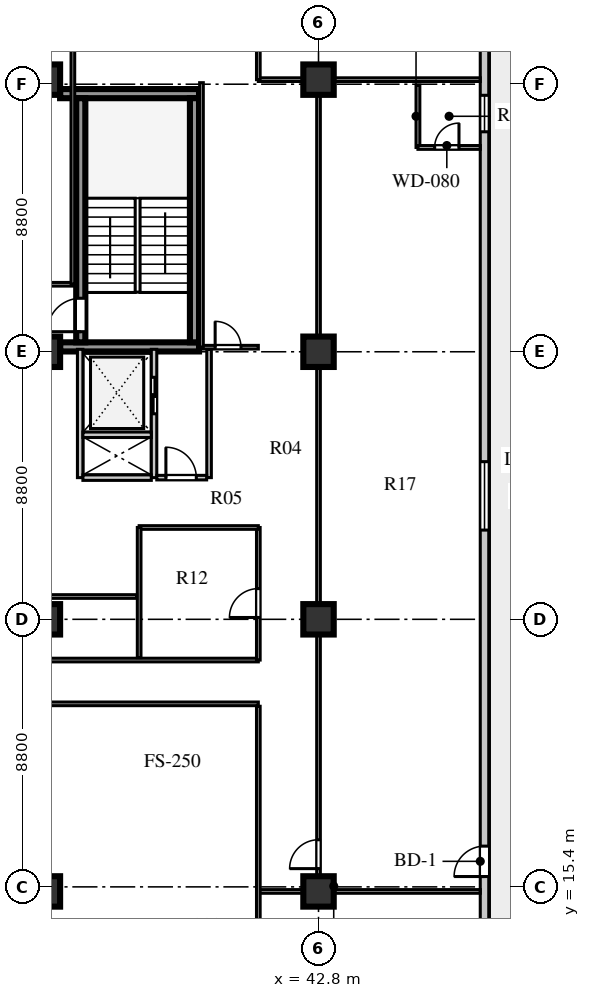
"""IFC4 building model, lengths in metres.
Left out: names, types, materials, properties, quantities, classifications, styles, units other than length and angle.
Written with IfcOpenShell. Run it as: python <this file> out.ifc"""

import sys

from ifc_helpers import new_model, si_unit, direction, frame, frame_2d, origin, origin_2d, place, context, subcontext, project, spatial, rectangle, extrude, element, fill, save


model = new_model("IFC4")
c1 = context("Model", 3, precision=1e-05, world=origin(), true_north=direction((0.0, 1.0)))
c2 = subcontext(c1, "Body", "Model", "MODEL_VIEW")
j1 = project(units=[si_unit("LENGTHUNIT", "METRE"), si_unit("PLANEANGLEUNIT", "RADIAN")], contexts=[c1])
p1 = place(None, origin())
s1 = spatial("IfcSite", under=j1, at=p1, CompositionType="ELEMENT")
p2 = place(p1, origin())
s2 = spatial("IfcBuilding", under=s1, at=p2, CompositionType="ELEMENT")
p3 = place(p2, frame((0.0, 0.0, 104.0)))
s3 = spatial("IfcBuildingStorey", under=s2, at=p3, CompositionType="ELEMENT", Elevation=104.0)
for number, where, z_axis, x_axis in (
    (1, (34.3, 33.16, 0.0), (0.0, 0.0, 1.0), (1.0, 0.0, 0.0)),
    (2, (34.3, 41.49, 0.0), (0.0, 0.0, 1.0), (1.0, 0.0, 0.0)),
):
    element("IfcWall", number, at=place(p3, frame(where, z_axis=z_axis, x_axis=x_axis)), inside=s3, PredefinedType="SHEAR", context=c2, shape_type="SweptSolid", body=[
        extrude(rectangle(XDim=4.57, YDim=0.3, at=frame_2d((2.285, 0.0))), origin(), (0.0, 0.0, 1.0), 3.6),
    ])
p4 = place(p3, frame((34.98, 33.31, 0.0), z_axis=(0.0, 0.0, 1.0), x_axis=(0.0, 1.0, 0.0)))
e3 = element("IfcWall", 3, at=p4, inside=s3, PredefinedType="SHEAR", context=c2, shape_type="SweptSolid", body=[
    extrude(rectangle(XDim=8.03, YDim=0.3, at=frame_2d((4.015, 0.0))), origin(), (0.0, 0.0, 1.0), 3.6),
])
p5 = place(p4, frame((0.35, 0.0, 0.0)))
e4 = element("IfcOpeningElement", 4, at=p5, cuts=e3, PredefinedType="OPENING", context=c2, shape_type="SweptSolid", body=[
    extrude(rectangle(XDim=1.1, YDim=2.1, at=frame_2d((0.55, 1.05))), frame((0.0, 0.16, 0.0), z_axis=(0.0, -1.0, 0.0), x_axis=(1.0, 0.0, 0.0)), (0.0, 0.0, 1.0), 0.32),
])
p6 = place(p3, frame((38.72, 33.31, 0.0), z_axis=(0.0, 0.0, 1.0), x_axis=(0.0, 1.0, 0.0)))
e5 = element("IfcWall", 5, at=p6, inside=s3, PredefinedType="SHEAR", context=c2, shape_type="SweptSolid", body=[
    extrude(rectangle(XDim=8.03, YDim=0.3, at=frame_2d((4.015, 0.0))), origin(), (0.0, 0.0, 1.0), 3.6),
])
for number, where, z_axis, x_axis in (
    (6, (33.8, 15.25, 0.0), (0.0, 0.0, 1.0), (1.0, 0.0, 0.0)),
    (7, (33.8, 24.2, 0.0), (0.0, 0.0, 1.0), (1.0, 0.0, 0.0)),
    (8, (33.8, 33.0, 0.0), (0.0, 0.0, 1.0), (1.0, 0.0, 0.0)),
    (9, (33.8, 41.95, 0.0), (0.0, 0.0, 1.0), (1.0, 0.0, 0.0)),
    (10, (42.8, 15.25, 0.0), (0.0, 0.0, 1.0), (1.0, 0.0, 0.0)),
    (11, (42.8, 24.2, 0.0), (0.0, 0.0, 1.0), (1.0, 0.0, 0.0)),
    (12, (42.8, 33.0, 0.0), (0.0, 0.0, 1.0), (1.0, 0.0, 0.0)),
    (13, (42.8, 41.95, 0.0), (0.0, 0.0, 1.0), (1.0, 0.0, 0.0)),
):
    element("IfcColumn", number, at=place(p3, frame(where, z_axis=z_axis, x_axis=x_axis)), inside=s3, PredefinedType="COLUMN", context=c2, shape_type="SweptSolid", body=[
        extrude(rectangle(XDim=1.0, YDim=1.0, at=origin_2d()), origin(), (0.0, 0.0, 1.0), 3.6),
    ])
p7 = place(p3, frame((48.26, 13.33, 0.0), z_axis=(0.0, 0.0, 1.0), x_axis=(0.0, 1.0, 0.0)))
e14 = element("IfcWall", 14, at=p7, inside=s3, PredefinedType="STANDARD", context=c2, shape_type="SweptSolid", body=[
    extrude(rectangle(XDim=30.54, YDim=0.28, at=frame_2d((15.27, 0.0))), origin(), (0.0, 0.0, 1.0), 3.6),
])
p8 = place(p7, frame((2.41, 0.0, 0.0)))
e15 = element("IfcOpeningElement", 15, at=p8, cuts=e14, PredefinedType="OPENING", context=c2, shape_type="SweptSolid", body=[
    extrude(rectangle(XDim=1.0, YDim=2.05, at=frame_2d((0.5, 1.025))), frame((0.0, 0.15, 0.0), z_axis=(0.0, -1.0, 0.0), x_axis=(1.0, 0.0, 0.0)), (0.0, 0.0, 1.0), 0.3),
])
p9 = place(p7, frame((13.805, 0.0, 0.8)))
e16 = element("IfcOpeningElement", 16, at=p9, cuts=e14, PredefinedType="OPENING", context=c2, shape_type="SweptSolid", body=[
    extrude(rectangle(XDim=2.25, YDim=2.0, at=frame_2d((1.125, 1.0))), frame((0.0, 0.15, 0.0), z_axis=(0.0, -1.0, 0.0), x_axis=(1.0, 0.0, 0.0)), (0.0, 0.0, 1.0), 0.3),
])
p10 = place(p7, frame((26.905, 0.0, 0.8)))
e17 = element("IfcOpeningElement", 17, at=p10, cuts=e14, PredefinedType="OPENING", context=c2, shape_type="SweptSolid", body=[
    extrude(rectangle(XDim=1.2, YDim=1.75, at=frame_2d((0.6, 0.875))), frame((0.0, 0.15, 0.0), z_axis=(0.0, -1.0, 0.0), x_axis=(1.0, 0.0, 0.0)), (0.0, 0.0, 1.0), 0.3),
])
p11 = place(p3, frame((34.96, 28.86, 0.0), z_axis=(0.0, 0.0, 1.0), x_axis=(0.0, 1.0, 0.0)))
e18 = element("IfcWall", 18, at=p11, inside=s3, PredefinedType="SOLIDWALL", context=c2, shape_type="SweptSolid", body=[
    extrude(rectangle(XDim=4.22, YDim=0.18, at=frame_2d((2.11, 0.0))), origin(), (0.0, 0.0, 1.0), 3.6),
])
p12 = place(p3, frame((37.39, 28.86, 0.0), z_axis=(0.0, 0.0, 1.0), x_axis=(0.0, 1.0, 0.0)))
e19 = element("IfcWall", 19, at=p12, inside=s3, PredefinedType="SOLIDWALL", context=c2, shape_type="SweptSolid", body=[
    extrude(rectangle(XDim=4.22, YDim=0.18, at=frame_2d((2.11, 0.0))), origin(), (0.0, 0.0, 1.0), 3.6),
])
p13 = place(p12, frame((2.1, 0.0, 0.0)))
e20 = element("IfcOpeningElement", 20, at=p13, cuts=e19, PredefinedType="OPENING", context=c2, shape_type="SweptSolid", body=[
    extrude(rectangle(XDim=1.2, YDim=2.12, at=frame_2d((0.6, 1.06))), frame((0.0, 0.1, 0.0), z_axis=(0.0, -1.0, 0.0), x_axis=(1.0, 0.0, 0.0)), (0.0, 0.0, 1.0), 0.2),
])
for number, where, z_axis, x_axis in (
    (21, (35.05, 28.86, 0.0), (0.0, 0.0, 1.0), (1.0, 0.0, 0.0)),
    (22, (35.05, 30.27, 0.0), (0.0, 0.0, 1.0), (1.0, 0.0, 0.0)),
):
    element("IfcWall", number, at=place(p3, frame(where, z_axis=z_axis, x_axis=x_axis)), inside=s3, PredefinedType="SOLIDWALL", context=c2, shape_type="SweptSolid", body=[
        extrude(rectangle(XDim=2.25, YDim=0.18, at=frame_2d((1.125, 0.0))), origin(), (0.0, 0.0, 1.0), 3.6),
    ])
p14 = place(p3, frame((39.2, 28.86, 0.0), z_axis=(0.0, 0.0, 1.0), x_axis=(0.0, 1.0, 0.0)))
e23 = element("IfcWall", 23, at=p14, inside=s3, PredefinedType="PARTITIONING", context=c2, shape_type="SweptSolid", body=[
    extrude(rectangle(XDim=4.22, YDim=0.15, at=frame_2d((2.11, 0.0))), origin(), (0.0, 0.0, 1.0), 3.6),
])
p15 = place(p3, frame((37.48, 28.86, 0.0), z_axis=(0.0, 0.0, 1.0), x_axis=(1.0, 0.0, 0.0)))
e24 = element("IfcWall", 24, at=p15, inside=s3, PredefinedType="PARTITIONING", context=c2, shape_type="SweptSolid", body=[
    extrude(rectangle(XDim=1.64, YDim=0.15, at=frame_2d((0.82, 0.0))), origin(), (0.0, 0.0, 1.0), 3.6),
])
p16 = place(p15, frame((0.3, 0.0, 0.0)))
e25 = element("IfcOpeningElement", 25, at=p16, cuts=e24, PredefinedType="OPENING", context=c2, shape_type="SweptSolid", body=[
    extrude(rectangle(XDim=1.0, YDim=2.1, at=frame_2d((0.5, 1.05))), frame((0.0, 0.085, 0.0), z_axis=(0.0, -1.0, 0.0), x_axis=(1.0, 0.0, 0.0)), (0.0, 0.0, 1.0), 0.17),
])
p17 = place(p3, frame((25.22, 21.42, 0.0), z_axis=(0.0, 0.0, 1.0), x_axis=(1.0, 0.0, 0.0)))
e26 = element("IfcWall", 26, at=p17, inside=s3, PredefinedType="PARTITIONING", context=c2, shape_type="SweptSolid", body=[
    extrude(rectangle(XDim=15.6, YDim=0.12, at=frame_2d((7.8, 0.0))), origin(), (0.0, 0.0, 1.0), 3.2),
])
p18 = place(p17, frame((0.73, 0.0, 0.0)))
e27 = element("IfcOpeningElement", 27, at=p18, cuts=e26, PredefinedType="OPENING", context=c2, shape_type="SweptSolid", body=[
    extrude(rectangle(XDim=0.95, YDim=2.1, at=frame_2d((0.475, 1.05))), frame((0.0, 0.07, 0.0), z_axis=(0.0, -1.0, 0.0), x_axis=(1.0, 0.0, 0.0)), (0.0, 0.0, 1.0), 0.14),
])
p19 = place(p3, frame((27.15, 22.86, 0.0), z_axis=(0.0, 0.0, 1.0), x_axis=(1.0, 0.0, 0.0)))
e28 = element("IfcWall", 28, at=p19, inside=s3, PredefinedType="PARTITIONING", context=c2, shape_type="SweptSolid", body=[
    extrude(rectangle(XDim=13.67, YDim=0.12, at=frame_2d((6.835, 0.0))), origin(), (0.0, 0.0, 1.0), 3.6),
])
p20 = place(p19, frame((2.2, 0.0, 0.0)))
e29 = element("IfcOpeningElement", 29, at=p20, cuts=e28, PredefinedType="OPENING", context=c2, shape_type="SweptSolid", body=[
    extrude(rectangle(XDim=0.9, YDim=2.08, at=frame_2d((0.45, 1.04))), frame((0.0, 0.07, 0.0), z_axis=(0.0, -1.0, 0.0), x_axis=(1.0, 0.0, 0.0)), (0.0, 0.0, 1.0), 0.14),
])
p21 = place(p3, frame((25.22, 35.22, 0.0), z_axis=(0.0, 0.0, 1.0), x_axis=(1.0, 0.0, 0.0)))
e30 = element("IfcWall", 30, at=p21, inside=s3, PredefinedType="PARTITIONING", context=c2, shape_type="SweptSolid", body=[
    extrude(rectangle(XDim=9.5, YDim=0.12, at=frame_2d((4.75, 0.0))), origin(), (0.0, 0.0, 1.0), 3.6),
])
p22 = place(p21, frame((0.65, 0.0, 0.0)))
e31 = element("IfcOpeningElement", 31, at=p22, cuts=e30, PredefinedType="OPENING", context=c2, shape_type="SweptSolid", body=[
    extrude(rectangle(XDim=0.95, YDim=2.1, at=frame_2d((0.475, 1.05))), frame((0.0, 0.07, 0.0), z_axis=(0.0, -1.0, 0.0), x_axis=(1.0, 0.0, 0.0)), (0.0, 0.0, 1.0), 0.14),
])
p23 = place(p21, frame((5.4, 0.0, 0.0)))
e32 = element("IfcOpeningElement", 32, at=p23, cuts=e30, PredefinedType="OPENING", context=c2, shape_type="SweptSolid", body=[
    extrude(rectangle(XDim=1.05, YDim=2.1, at=frame_2d((0.525, 1.05))), frame((0.0, 0.07, 0.0), z_axis=(0.0, -1.0, 0.0), x_axis=(1.0, 0.0, 0.0)), (0.0, 0.0, 1.0), 0.14),
])
p24 = place(p3, frame((42.8, 15.25, 0.0), z_axis=(0.0, 0.0, 1.0), x_axis=(0.0, 1.0, 0.0)))
e33 = element("IfcWall", 33, at=p24, inside=s3, PredefinedType="PARTITIONING", context=c2, shape_type="SweptSolid", body=[
    extrude(rectangle(XDim=26.7, YDim=0.12, at=frame_2d((13.35, 0.0))), origin(), (0.0, 0.0, 1.0), 2.95),
])
p25 = place(p24, frame((0.75, 0.0, 0.0)))
e34 = element("IfcOpeningElement", 34, at=p25, cuts=e33, PredefinedType="OPENING", context=c2, shape_type="SweptSolid", body=[
    extrude(rectangle(XDim=0.95, YDim=2.1, at=frame_2d((0.475, 1.05))), frame((0.0, 0.07, 0.0), z_axis=(0.0, -1.0, 0.0), x_axis=(1.0, 0.0, 0.0)), (0.0, 0.0, 1.0), 0.14),
])
for number, where, z_axis, x_axis in (
    (35, (40.82, 15.25, 0.0), (0.0, 0.0, 1.0), (1.0, 0.0, 0.0)),
    (36, (40.82, 41.95, 0.0), (0.0, 0.0, 1.0), (1.0, 0.0, 0.0)),
):
    element("IfcWall", number, at=place(p3, frame(where, z_axis=z_axis, x_axis=x_axis)), inside=s3, PredefinedType="PARTITIONING", context=c2, shape_type="SweptSolid", body=[
        extrude(rectangle(XDim=7.3, YDim=0.12, at=frame_2d((3.65, 0.0))), origin(), (0.0, 0.0, 1.0), 2.95),
    ])
p26 = place(p3, frame((40.82, 22.86, 0.0), z_axis=(0.0, 0.0, 1.0), x_axis=(0.0, 1.0, 0.0)))
e37 = element("IfcWall", 37, at=p26, inside=s3, PredefinedType="PARTITIONING", context=c2, shape_type="SweptSolid", body=[
    extrude(rectangle(XDim=4.36, YDim=0.12, at=frame_2d((2.18, 0.0))), origin(), (0.0, 0.0, 1.0), 3.6),
])
p27 = place(p26, frame((1.4, 0.0, 0.0)))
e38 = element("IfcOpeningElement", 38, at=p27, cuts=e37, PredefinedType="OPENING", context=c2, shape_type="SweptSolid", body=[
    extrude(rectangle(XDim=0.95, YDim=2.1, at=frame_2d((0.475, 1.05))), frame((0.0, 0.07, 0.0), z_axis=(0.0, -1.0, 0.0), x_axis=(1.0, 0.0, 0.0)), (0.0, 0.0, 1.0), 0.14),
])
p28 = place(p3, frame((36.9, 27.22, 0.0), z_axis=(0.0, 0.0, 1.0), x_axis=(1.0, 0.0, 0.0)))
e39 = element("IfcWall", 39, at=p28, inside=s3, PredefinedType="PARTITIONING", context=c2, shape_type="SweptSolid", body=[
    extrude(rectangle(XDim=3.92, YDim=0.12, at=frame_2d((1.96, 0.0))), origin(), (0.0, 0.0, 1.0), 3.2),
])
p29 = place(p3, frame((36.9, 22.94, 0.0), z_axis=(0.0, 0.0, 1.0), x_axis=(0.0, 1.0, 0.0)))
e40 = element("IfcWall", 40, at=p29, inside=s3, PredefinedType="PARTITIONING", context=c2, shape_type="SweptSolid", body=[
    extrude(rectangle(XDim=4.28, YDim=0.12, at=frame_2d((2.14, 0.0))), origin(), (0.0, 0.0, 1.0), 3.6),
])
p30 = place(p3, frame((27.15, 24.95, 0.0), z_axis=(0.0, 0.0, 1.0), x_axis=(1.0, 0.0, 0.0)))
e41 = element("IfcWall", 41, at=p30, inside=s3, PredefinedType="PARTITIONING", context=c2, shape_type="SweptSolid", body=[
    extrude(rectangle(XDim=9.67, YDim=0.12, at=frame_2d((4.835, 0.0))), origin(), (0.0, 0.0, 1.0), 3.05),
])
p31 = place(p3, frame((40.82, 10.28, 0.0), z_axis=(0.0, 0.0, 1.0), x_axis=(0.0, 1.0, 0.0)))
e42 = element("IfcWall", 42, at=p31, inside=s3, PredefinedType="PARTITIONING", context=c2, shape_type="SweptSolid", body=[
    extrude(rectangle(XDim=11.06, YDim=0.12, at=frame_2d((5.53, 0.0))), origin(), (0.0, 0.0, 1.0), 3.6),
])
p32 = place(p3, frame((46.07, 39.72, 0.0), z_axis=(0.0, 0.0, 1.0), x_axis=(0.0, 1.0, 0.0)))
e43 = element("IfcWall", 43, at=p32, inside=s3, PredefinedType="PLUMBINGWALL", context=c2, shape_type="SweptSolid", body=[
    extrude(rectangle(XDim=2.05, YDim=0.125, at=frame_2d((1.025, 0.0))), origin(), (0.0, 0.0, 1.0), 3.6),
])
p33 = place(p3, frame((46.07, 39.72, 0.0), z_axis=(0.0, 0.0, 1.0), x_axis=(1.0, 0.0, 0.0)))
e44 = element("IfcWall", 44, at=p33, inside=s3, PredefinedType="PLUMBINGWALL", context=c2, shape_type="SweptSolid", body=[
    extrude(rectangle(XDim=2.05, YDim=0.125, at=frame_2d((1.025, 0.0))), origin(), (0.0, 0.0, 1.0), 3.6),
])
p34 = place(p33, frame((0.55, 0.0, 0.0)))
e45 = element("IfcOpeningElement", 45, at=p34, cuts=e44, PredefinedType="OPENING", context=c2, shape_type="SweptSolid", body=[
    extrude(rectangle(XDim=0.8, YDim=2.05, at=frame_2d((0.4, 1.025))), frame((0.0, 0.073, 0.0), z_axis=(0.0, -1.0, 0.0), x_axis=(1.0, 0.0, 0.0)), (0.0, 0.0, 1.0), 0.145),
])
p35 = place(p3, frame((34.72, 35.22, 0.0), z_axis=(0.0, 0.0, 1.0), x_axis=(0.0, 1.0, 0.0)))
e46 = element("IfcWall", 46, at=p35, inside=s3, PredefinedType="PARTITIONING", context=c2, shape_type="SweptSolid", body=[
    extrude(rectangle(XDim=11.7, YDim=0.12, at=frame_2d((5.85, 0.0))), origin(), (0.0, 0.0, 1.0), 3.6),
])
p36 = place(p3, frame((38.95, 33.15, 0.0), z_axis=(0.0, 0.0, 1.0), x_axis=(1.0, 0.0, 0.0)))
e47 = element("IfcWall", 47, at=p36, inside=s3, PredefinedType="PARTITIONING", context=c2, shape_type="SweptSolid", body=[
    extrude(rectangle(XDim=1.87, YDim=0.12, at=frame_2d((0.935, 0.0))), origin(), (0.0, 0.0, 1.0), 3.6),
])
p37 = place(p36, frame((0.45, 0.0, 0.0)))
e48 = element("IfcOpeningElement", 48, at=p37, cuts=e47, PredefinedType="OPENING", context=c2, shape_type="SweptSolid", body=[
    extrude(rectangle(XDim=0.85, YDim=2.05, at=frame_2d((0.425, 1.025))), frame((0.0, 0.07, 0.0), z_axis=(0.0, -1.0, 0.0), x_axis=(1.0, 0.0, 0.0)), (0.0, 0.0, 1.0), 0.14),
])
p38 = place(p3, frame((38.95, 33.15, 0.0), z_axis=(0.0, 0.0, 1.0), x_axis=(0.0, 1.0, 0.0)))
e49 = element("IfcWall", 49, at=p38, inside=s3, PredefinedType="PARTITIONING", context=c2, shape_type="SweptSolid", body=[
    extrude(rectangle(XDim=8.7, YDim=0.12, at=frame_2d((4.35, 0.0))), origin(), (0.0, 0.0, 1.0), 3.6),
])
p39 = place(p3, frame((40.82, 41.95, 0.0), z_axis=(0.0, 0.0, 1.0), x_axis=(0.0, 1.0, 0.0)))
e50 = element("IfcWall", 50, at=p39, inside=s3, PredefinedType="PARTITIONING", context=c2, shape_type="SweptSolid", body=[
    extrude(rectangle(XDim=4.97, YDim=0.12, at=frame_2d((2.485, 0.0))), origin(), (0.0, 0.0, 1.0), 3.6),
])
p40 = place(p8, frame((1.0, 0.0, 0.0), z_axis=(0.0, 0.0, 1.0), x_axis=(-1.0, 0.0, 0.0)))
e51 = element("IfcDoor", 51, at=p40, inside=s3, OperationType="SINGLE_SWING_RIGHT", PredefinedType="DOOR", context=c2, shape_type="SweptSolid", body=[
    extrude(rectangle(XDim=1.0, YDim=2.05, at=frame_2d((0.5, 1.025))), frame((0.0, 0.025, 0.0), z_axis=(0.0, -1.0, 0.0), x_axis=(1.0, 0.0, 0.0)), (0.0, 0.0, 1.0), 0.05),
])
fill(e15, e51)
p41 = place(p9, origin())
e52 = element("IfcWindow", 52, at=p41, inside=s3, PartitioningType="SINGLE_PANEL", PredefinedType="WINDOW", context=c2, shape_type="SweptSolid", body=[
    extrude(rectangle(XDim=2.25, YDim=2.0, at=frame_2d((1.125, 1.0))), frame((0.0, 0.03, 0.0), z_axis=(0.0, -1.0, 0.0), x_axis=(1.0, 0.0, 0.0)), (0.0, 0.0, 1.0), 0.06),
])
fill(e16, e52)
p42 = place(p10, origin())
e53 = element("IfcWindow", 53, at=p42, inside=s3, PartitioningType="SINGLE_PANEL", PredefinedType="WINDOW", context=c2, shape_type="SweptSolid", body=[
    extrude(rectangle(XDim=1.2, YDim=1.75, at=frame_2d((0.6, 0.875))), frame((0.0, 0.03, 0.0), z_axis=(0.0, -1.0, 0.0), x_axis=(1.0, 0.0, 0.0)), (0.0, 0.0, 1.0), 0.06),
])
fill(e17, e53)
p43 = place(p5, origin())
e54 = element("IfcDoor", 54, at=p43, inside=s3, OperationType="SINGLE_SWING_LEFT", PredefinedType="DOOR", context=c2, shape_type="SweptSolid", body=[
    extrude(rectangle(XDim=1.1, YDim=2.1, at=frame_2d((0.55, 1.05))), frame((0.0, 0.025, 0.0), z_axis=(0.0, -1.0, 0.0), x_axis=(1.0, 0.0, 0.0)), (0.0, 0.0, 1.0), 0.05),
])
fill(e4, e54)
p44 = place(p13, frame((1.2, 0.0, 0.0), z_axis=(0.0, 0.0, 1.0), x_axis=(-1.0, 0.0, 0.0)))
e55 = element("IfcDoor", 55, at=p44, inside=s3, OperationType="DOUBLE_DOOR_SLIDING", PredefinedType="DOOR", context=c2, shape_type="SweptSolid", body=[
    extrude(rectangle(XDim=1.2, YDim=2.12, at=frame_2d((0.6, 1.06))), frame((0.0, 0.025, 0.0), z_axis=(0.0, -1.0, 0.0), x_axis=(1.0, 0.0, 0.0)), (0.0, 0.0, 1.0), 0.05),
])
fill(e20, e55)
p45 = place(p16, origin())
e56 = element("IfcDoor", 56, at=p45, inside=s3, OperationType="SINGLE_SWING_LEFT", PredefinedType="DOOR", context=c2, shape_type="SweptSolid", body=[
    extrude(rectangle(XDim=1.0, YDim=2.1, at=frame_2d((0.5, 1.05))), frame((0.0, 0.025, 0.0), z_axis=(0.0, -1.0, 0.0), x_axis=(1.0, 0.0, 0.0)), (0.0, 0.0, 1.0), 0.05),
])
fill(e25, e56)
p46 = place(p27, frame((0.95, 0.0, 0.0), z_axis=(0.0, 0.0, 1.0), x_axis=(-1.0, 0.0, 0.0)))
e57 = element("IfcDoor", 57, at=p46, inside=s3, OperationType="SINGLE_SWING_RIGHT", PredefinedType="DOOR", context=c2, shape_type="SweptSolid", body=[
    extrude(rectangle(XDim=0.95, YDim=2.1, at=frame_2d((0.475, 1.05))), frame((0.0, 0.025, 0.0), z_axis=(0.0, -1.0, 0.0), x_axis=(1.0, 0.0, 0.0)), (0.0, 0.0, 1.0), 0.05),
])
fill(e38, e57)
p47 = place(p25, origin())
e58 = element("IfcDoor", 58, at=p47, inside=s3, OperationType="SINGLE_SWING_LEFT", PredefinedType="DOOR", context=c2, shape_type="SweptSolid", body=[
    extrude(rectangle(XDim=0.95, YDim=2.1, at=frame_2d((0.475, 1.05))), frame((0.0, 0.025, 0.0), z_axis=(0.0, -1.0, 0.0), x_axis=(1.0, 0.0, 0.0)), (0.0, 0.0, 1.0), 0.05),
])
fill(e34, e58)
p48 = place(p34, frame((0.8, 0.0, 0.0), z_axis=(0.0, 0.0, 1.0), x_axis=(-1.0, 0.0, 0.0)))
e59 = element("IfcDoor", 59, at=p48, inside=s3, OperationType="SINGLE_SWING_LEFT", PredefinedType="DOOR", context=c2, shape_type="SweptSolid", body=[
    extrude(rectangle(XDim=0.8, YDim=2.05, at=frame_2d((0.4, 1.025))), frame((0.0, 0.025, 0.0), z_axis=(0.0, -1.0, 0.0), x_axis=(1.0, 0.0, 0.0)), (0.0, 0.0, 1.0), 0.05),
])
fill(e45, e59)
p49 = place(p37, origin())
e60 = element("IfcDoor", 60, at=p49, inside=s3, OperationType="SINGLE_SWING_LEFT", PredefinedType="DOOR", context=c2, shape_type="SweptSolid", body=[
    extrude(rectangle(XDim=0.85, YDim=2.05, at=frame_2d((0.425, 1.025))), frame((0.0, 0.025, 0.0), z_axis=(0.0, -1.0, 0.0), x_axis=(1.0, 0.0, 0.0)), (0.0, 0.0, 1.0), 0.05),
])
fill(e48, e60)
save(model, sys.argv[1])
